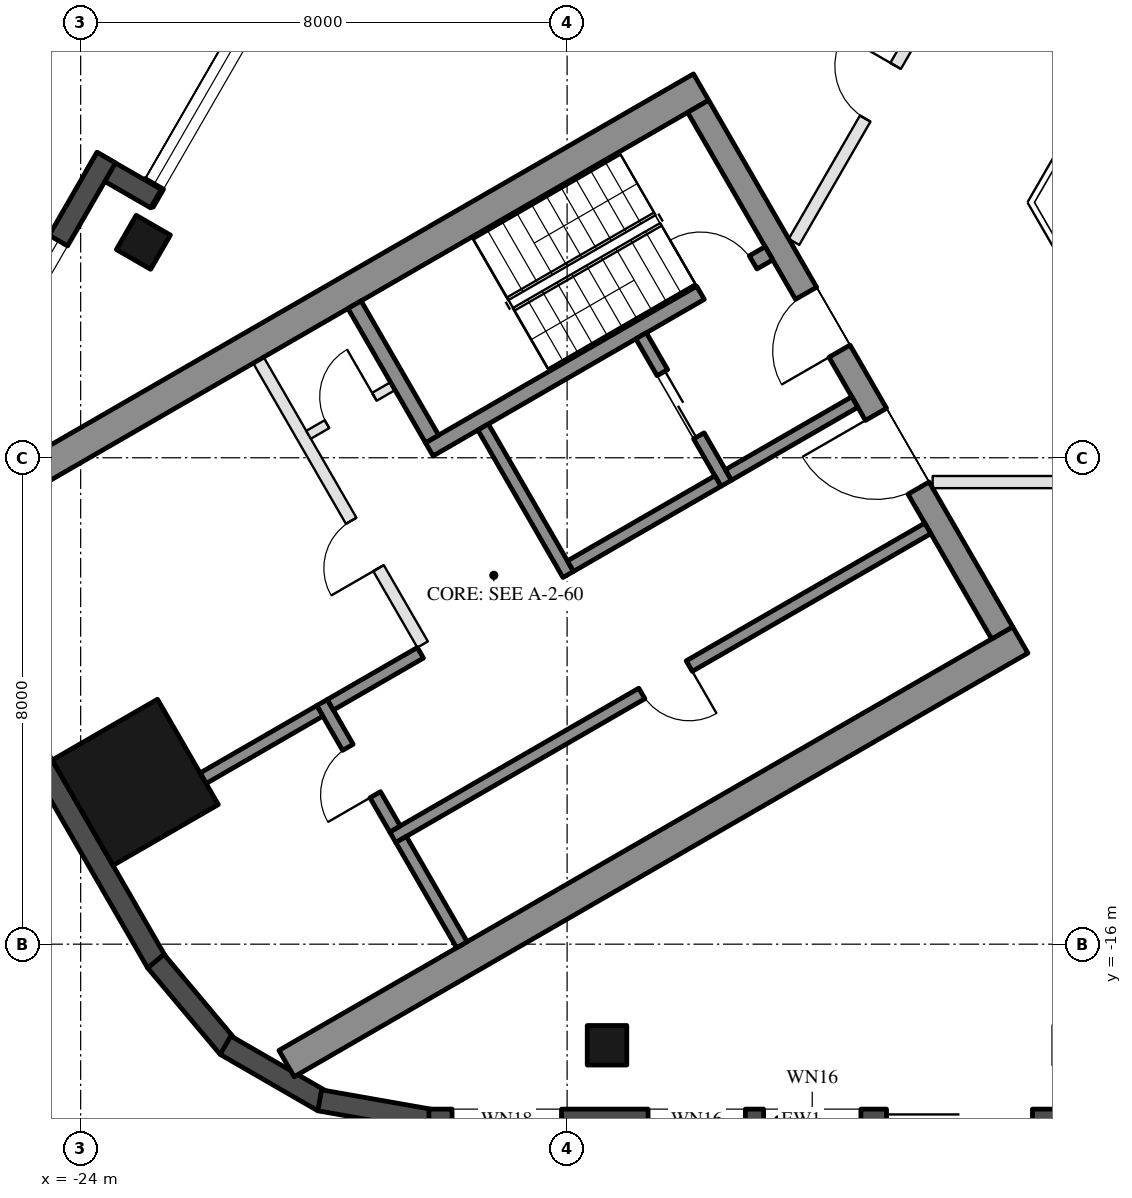
"""IFC4 building model, lengths in metres.
Left out: names, types, materials, properties, quantities, classifications, styles, units other than length and angle.
Written with IfcOpenShell. Run it as: python <this file> out.ifc"""

import sys

from ifc_helpers import new_model, si_unit, direction, frame, frame_2d, origin, origin_2d, place, context, subcontext, project, spatial, rectangle, hollow_rectangle, extrude, boolean, halfspace, element, fill, save


model = new_model("IFC4")
c1 = context("Model", 3, precision=1e-05, world=origin(), true_north=direction((0.0, 1.0)))
c2 = subcontext(c1, "Body", "Model", "MODEL_VIEW")
j1 = project(units=[si_unit("LENGTHUNIT", "METRE"), si_unit("PLANEANGLEUNIT", "RADIAN")], contexts=[c1])
p1 = place(None, origin())
s1 = spatial("IfcSite", under=j1, at=p1, CompositionType="ELEMENT")
p2 = place(p1, origin())
s2 = spatial("IfcBuilding", under=s1, at=p2, CompositionType="ELEMENT")
p3 = place(p2, frame((0.0, 0.0, 257.8)))
s3 = spatial("IfcBuildingStorey", under=s2, at=p3, CompositionType="ELEMENT", Elevation=257.8)
for number, where, z_axis, x_axis in (
    (1, (-15.344, -17.663, 0.0), (0.0, 0.0, 1.0), (-1.0, 0.0, 0.0)),
    (2, (-22.968, -4.457, 0.0), (0.0, 0.0, 1.0), (0.5, 0.866, 0.0)),
):
    element("IfcColumn", number, at=place(p3, frame(where, z_axis=z_axis, x_axis=x_axis)), inside=s3, PredefinedType="COLUMN", context=c2, shape_type="SweptSolid", body=[
        boolean("DIFFERENCE", extrude(hollow_rectangle(XDim=0.65, YDim=0.65, WallThickness=0.03, at=origin_2d()), origin(), (0.0, 0.0, 1.0), 3.7), halfspace(frame((0.0, 0.0, 0.047), z_axis=(0.0, 0.0, 1.0), x_axis=(1.0, 0.0, 0.0)), True)),
    ])
p4 = place(p3, frame((-23.102, -13.338, 0.0), z_axis=(0.0, 0.0, 1.0), x_axis=(-0.5, 0.866025403784, 0.0)))
e3 = element("IfcColumn", 3, at=p4, inside=s3, PredefinedType="COLUMN", context=c2, shape_type="SweptSolid", body=[
    boolean("DIFFERENCE", extrude(hollow_rectangle(XDim=2.0, YDim=2.0, WallThickness=0.05, at=origin_2d()), origin(), (0.0, 0.0, 1.0), 3.7), halfspace(frame((0.0, 0.0, 0.112), z_axis=(0.0, 0.0, 1.0), x_axis=(1.0, 0.0, 0.0)), True)),
])
p5 = place(p3, frame((-19.704, 1.848, 0.0), z_axis=(0.0, 0.0, 1.0), x_axis=(-0.499993986225, -0.866028875811, 0.0)))
e4 = element("IfcWall", 4, at=p5, inside=s3, PredefinedType="SOLIDWALL", context=c2, shape_type="SweptSolid", body=[
    extrude(rectangle(XDim=6.512, YDim=0.35, at=frame_2d((3.256, 0.0))), origin(), (0.0, 0.0, 1.0), 3.55),
])
p6 = place(p5, frame((0.77, 0.0, 0.0)))
e5 = element("IfcOpeningElement", 5, at=p6, cuts=e4, PredefinedType="OPENING", context=c2, shape_type="SweptSolid", body=[
    extrude(rectangle(XDim=2.4, YDim=2.4, at=frame_2d((1.2, 1.2))), frame((0.0, 0.185, 0.0), z_axis=(0.0, -1.0, 0.0), x_axis=(1.0, 0.0, 0.0)), (0.0, 0.0, 1.0), 0.37),
])
p7 = place(p5, frame((3.47, 0.0, 0.3)))
e6 = element("IfcOpeningElement", 6, at=p7, cuts=e4, PredefinedType="OPENING", context=c2, shape_type="SweptSolid", body=[
    extrude(rectangle(XDim=2.7, YDim=2.65, at=frame_2d((1.35, 1.325))), frame((0.0, 0.185, 0.0), z_axis=(0.0, -1.0, 0.0), x_axis=(1.0, 0.0, 0.0)), (0.0, 0.0, 1.0), 0.37),
])
p8 = place(p3, frame((-22.762, -3.739, 0.0), z_axis=(0.0, 0.0, 1.0), x_axis=(-0.866042269935, 0.499970785833, 0.0)))
e7 = element("IfcWall", 7, at=p8, inside=s3, PredefinedType="SOLIDWALL", context=c2, shape_type="SweptSolid", body=[
    extrude(rectangle(XDim=1.22, YDim=0.35, at=frame_2d((0.61, 0.0))), origin(), (0.0, 0.0, 1.0), 3.55),
])
p9 = place(p3, frame((-23.579, -3.065, 0.0), z_axis=(0.0, 0.0, 1.0), x_axis=(-0.500048109927, -0.865997625723, 0.0)))
e8 = element("IfcWall", 8, at=p9, inside=s3, PredefinedType="SOLIDWALL", context=c2, shape_type="SweptSolid", body=[
    extrude(rectangle(XDim=3.829, YDim=0.35, at=frame_2d((1.914, 0.0))), origin(), (0.0, 0.0, 1.0), 3.55),
])
p10 = place(p9, frame((1.575, 0.0, 0.3)))
e9 = element("IfcOpeningElement", 9, at=p10, cuts=e8, PredefinedType="OPENING", context=c2, shape_type="SweptSolid", body=[
    extrude(rectangle(XDim=0.8, YDim=2.65, at=frame_2d((0.4, 1.325))), frame((0.0, 0.185, 0.0), z_axis=(0.0, -1.0, 0.0), x_axis=(1.0, 0.0, 0.0)), (0.0, 0.0, 1.0), 0.37),
])
p11 = place(p3, frame((-25.494, -11.546, 0.0), z_axis=(0.0, 0.0, 1.0), x_axis=(0.500028854569, -0.86600874395, 0.0)))
e10 = element("IfcWall", 10, at=p11, inside=s3, PredefinedType="SOLIDWALL", context=c2, shape_type="SweptSolid", body=[
    extrude(rectangle(XDim=5.495, YDim=0.35, at=frame_2d((2.748, 0.0))), origin(), (0.0, 0.0, 1.0), 3.55),
])
for number, where, z_axis, x_axis in (
    (11, (-22.764, -16.28, 0.0), (0.0, 0.0, 1.0), (0.643, -0.766, 0.0)),
    (12, (-21.618, -17.662, 0.0), (0.0, 0.0, 1.0), (0.866, -0.5, 0.0)),
):
    element("IfcWall", number, at=place(p3, frame(where, z_axis=z_axis, x_axis=x_axis)), inside=s3, PredefinedType="SOLIDWALL", context=c2, shape_type="SweptSolid", body=[
        extrude(rectangle(XDim=1.855, YDim=0.35, at=frame_2d((0.927, 0.0))), origin(), (0.0, 0.0, 1.0), 3.55),
    ])
p12 = place(p3, frame((-20.069, -18.568, 0.0), z_axis=(0.0, 0.0, 1.0), x_axis=(0.984791508075, -0.173740282098, 0.0)))
e13 = element("IfcWall", 13, at=p12, inside=s3, PredefinedType="SOLIDWALL", context=c2, shape_type="SweptSolid", body=[
    extrude(rectangle(XDim=1.855, YDim=0.35, at=frame_2d((0.927, 0.0))), origin(), (0.0, 0.0, 1.0), 3.55),
])
p13 = place(p3, frame((-18.272, -18.888, 0.0), z_axis=(0.0, 0.0, 1.0), x_axis=(1.0, 0.0, 0.0)))
e14 = element("IfcWall", 14, at=p13, inside=s3, PredefinedType="SOLIDWALL", context=c2, shape_type="SweptSolid", body=[
    extrude(rectangle(XDim=11.5, YDim=0.35, at=frame_2d((5.75, 0.0))), origin(), (0.0, 0.0, 1.0), 3.55),
])
p14 = place(p13, frame((0.38, 0.0, 0.3)))
e15 = element("IfcOpeningElement", 15, at=p14, cuts=e14, PredefinedType="OPENING", context=c2, shape_type="SweptSolid", body=[
    extrude(rectangle(XDim=1.8, YDim=2.65, at=frame_2d((0.9, 1.325))), frame((0.0, 0.185, 0.0), z_axis=(0.0, -1.0, 0.0), x_axis=(1.0, 0.0, 0.0)), (0.0, 0.0, 1.0), 0.37),
])
p15 = place(p13, frame((7.525, 0.0, 0.0)))
e16 = element("IfcOpeningElement", 16, at=p15, cuts=e14, PredefinedType="OPENING", context=c2, shape_type="SweptSolid", body=[
    extrude(rectangle(XDim=2.4, YDim=2.4, at=frame_2d((1.2, 1.2))), frame((0.0, 0.185, 0.0), z_axis=(0.0, -1.0, 0.0), x_axis=(1.0, 0.0, 0.0)), (0.0, 0.0, 1.0), 0.37),
])
p16 = place(p13, frame((3.604, 0.0, 0.3)))
e17 = element("IfcOpeningElement", 17, at=p16, cuts=e14, PredefinedType="OPENING", context=c2, shape_type="SweptSolid", body=[
    extrude(rectangle(XDim=1.6, YDim=2.65, at=frame_2d((0.8, 1.325))), frame((0.0, 0.185, 0.0), z_axis=(0.0, -1.0, 0.0), x_axis=(1.0, 0.0, 0.0)), (0.0, 0.0, 1.0), 0.37),
])
p17 = place(p13, frame((5.504, 0.0, 0.3)))
e18 = element("IfcOpeningElement", 18, at=p17, cuts=e14, PredefinedType="OPENING", context=c2, shape_type="SweptSolid", body=[
    extrude(rectangle(XDim=1.6, YDim=2.65, at=frame_2d((0.8, 1.325))), frame((0.0, 0.185, 0.0), z_axis=(0.0, -1.0, 0.0), x_axis=(1.0, 0.0, 0.0)), (0.0, 0.0, 1.0), 0.37),
])
for number, where, z_axis, x_axis in (
    (19, (-13.797, -1.903, 0.0), (0.0, 0.0, 1.0), (-0.866, -0.5, 0.0)),
    (20, (-8.547, -10.997, 0.0), (0.0, 0.0, 1.0), (-0.866, -0.5, 0.0)),
):
    element("IfcWall", number, at=place(p3, frame(where, z_axis=z_axis, x_axis=x_axis)), inside=s3, PredefinedType="SHEAR", context=c2, shape_type="SweptSolid", body=[
        extrude(rectangle(XDim=13.934, YDim=0.5, at=frame_2d((6.967, 0.0))), origin(), (0.0, 0.0, 1.0), 3.5),
    ])
p18 = place(p3, frame((-13.845, -2.22, 0.0), z_axis=(0.0, 0.0, 1.0), x_axis=(0.500004234368, -0.866022959057, 0.0)))
e21 = element("IfcWall", 21, at=p18, inside=s3, PredefinedType="SHEAR", context=c2, shape_type="SweptSolid", body=[
    extrude(rectangle(XDim=10.0, YDim=0.4, at=frame_2d((5.0, 0.0))), origin(), (0.0, 0.0, 1.0), 3.5),
])
p19 = place(p18, frame((3.55, 0.0, 0.0)))
e22 = element("IfcOpeningElement", 22, at=p19, cuts=e21, PredefinedType="OPENING", context=c2, shape_type="SweptSolid", body=[
    extrude(rectangle(XDim=1.1, YDim=2.1, at=frame_2d((0.55, 1.05))), frame((0.0, 0.21, 0.0), z_axis=(0.0, -1.0, 0.0), x_axis=(1.0, 0.0, 0.0)), (0.0, 0.0, 1.0), 0.42),
])
p20 = place(p18, frame((5.85, 0.0, 0.0)))
e23 = element("IfcOpeningElement", 23, at=p20, cuts=e21, PredefinedType="OPENING", context=c2, shape_type="SweptSolid", body=[
    extrude(rectangle(XDim=1.4, YDim=2.1, at=frame_2d((0.7, 1.05))), frame((0.0, 0.21, 0.0), z_axis=(0.0, -1.0, 0.0), x_axis=(1.0, 0.0, 0.0)), (0.0, 0.0, 1.0), 0.42),
])
p21 = place(p3, frame((-12.681, -4.636, 0.0), z_axis=(0.0, 0.0, 1.0), x_axis=(-0.866021702275, -0.500006411147, 0.0)))
e24 = element("IfcWall", 24, at=p21, inside=s3, PredefinedType="SHEAR", context=c2, shape_type="SweptSolid", body=[
    extrude(rectangle(XDim=6.45, YDim=0.25, at=frame_2d((3.225, 0.0))), origin(), (0.0, 0.0, 1.0), 3.5),
])
p22 = place(p21, frame((0.3, 0.0, 0.0)))
e25 = element("IfcOpeningElement", 25, at=p22, cuts=e24, PredefinedType="OPENING", context=c2, shape_type="SweptSolid", body=[
    extrude(rectangle(XDim=1.0, YDim=2.1, at=frame_2d((0.5, 1.05))), frame((0.0, 0.135, 0.0), z_axis=(0.0, -1.0, 0.0), x_axis=(1.0, 0.0, 0.0)), (0.0, 0.0, 1.0), 0.27),
])
p23 = place(p3, frame((-19.496, -5.482, 0.0), z_axis=(0.0, 0.0, 1.0), x_axis=(0.499990435942, -0.866030925526, 0.0)))
e26 = element("IfcWall", 26, at=p23, inside=s3, PredefinedType="SHEAR", context=c2, shape_type="SweptSolid", body=[
    extrude(rectangle(XDim=2.55, YDim=0.25, at=frame_2d((1.275, 0.0))), origin(), (0.0, 0.0, 1.0), 3.5),
])
p24 = place(p3, frame((-17.381, -7.495, 0.0), z_axis=(0.0, 0.0, 1.0), x_axis=(0.500011755427, -0.866018616679, 0.0)))
e27 = element("IfcWall", 27, at=p24, inside=s3, PredefinedType="SHEAR", context=c2, shape_type="SweptSolid", body=[
    extrude(rectangle(XDim=2.8, YDim=0.2, at=frame_2d((1.4, 0.0))), origin(), (0.0, 0.0, 1.0), 3.5),
])
p25 = place(p3, frame((-14.783, -5.995, 0.0), z_axis=(0.0, 0.0, 1.0), x_axis=(0.49994636267, -0.866056369097, 0.0)))
e28 = element("IfcWall", 28, at=p25, inside=s3, PredefinedType="SHEAR", context=c2, shape_type="SweptSolid", body=[
    extrude(rectangle(XDim=2.8, YDim=0.2, at=frame_2d((1.4, 0.0))), origin(), (0.0, 0.0, 1.0), 3.5),
])
p26 = place(p25, frame((0.7, 0.0, 0.0)))
e29 = element("IfcOpeningElement", 29, at=p26, cuts=e28, PredefinedType="OPENING", context=c2, shape_type="SweptSolid", body=[
    extrude(rectangle(XDim=1.2, YDim=2.1, at=frame_2d((0.6, 1.05))), frame((0.0, 0.11, 0.0), z_axis=(0.0, -1.0, 0.0), x_axis=(1.0, 0.0, 0.0)), (0.0, 0.0, 1.0), 0.22),
])
p27 = place(p3, frame((-13.52, -8.383, 0.0), z_axis=(0.0, 0.0, 1.0), x_axis=(-0.866034573852, -0.49998411664, 0.0)))
e30 = element("IfcWall", 30, at=p27, inside=s3, PredefinedType="SHEAR", context=c2, shape_type="SweptSolid", body=[
    extrude(rectangle(XDim=2.8, YDim=0.2, at=frame_2d((1.4, 0.0))), origin(), (0.0, 0.0, 1.0), 3.5),
])
p28 = place(p3, frame((-11.268, -7.083, 0.0), z_axis=(0.0, 0.0, 1.0), x_axis=(-0.866050077142, -0.499957262057, 0.0)))
e31 = element("IfcWall", 31, at=p28, inside=s3, PredefinedType="SHEAR", context=c2, shape_type="SweptSolid", body=[
    extrude(rectangle(XDim=2.4, YDim=0.2, at=frame_2d((1.2, 0.0))), origin(), (0.0, 0.0, 1.0), 3.5),
])
p29 = place(p3, frame((-10.068, -9.162, 0.0), z_axis=(0.0, 0.0, 1.0), x_axis=(-0.866032725843, -0.499987317609, 0.0)))
e32 = element("IfcWall", 32, at=p29, inside=s3, PredefinedType="SHEAR", context=c2, shape_type="SweptSolid", body=[
    extrude(rectangle(XDim=10.16, YDim=0.2, at=frame_2d((5.08, 0.0))), origin(), (0.0, 0.0, 1.0), 3.5),
])
p30 = place(p29, frame((4.53, 0.0, 0.0)))
e33 = element("IfcOpeningElement", 33, at=p30, cuts=e32, PredefinedType="OPENING", context=c2, shape_type="SweptSolid", body=[
    extrude(rectangle(XDim=0.9, YDim=2.1, at=frame_2d((0.45, 1.05))), frame((0.0, 0.11, 0.0), z_axis=(0.0, -1.0, 0.0), x_axis=(1.0, 0.0, 0.0)), (0.0, 0.0, 1.0), 0.22),
])
p31 = place(p3, frame((-20.031, -12.026, 0.0), z_axis=(0.0, 0.0, 1.0), x_axis=(0.500033551112, -0.866006032174, 0.0)))
e34 = element("IfcWall", 34, at=p31, inside=s3, PredefinedType="SHEAR", context=c2, shape_type="SweptSolid", body=[
    extrude(rectangle(XDim=2.4, YDim=0.2, at=frame_2d((1.2, 0.0))), origin(), (0.0, 0.0, 1.0), 3.5),
])
p32 = place(p31, frame((0.85, 0.0, 0.0)))
e35 = element("IfcOpeningElement", 35, at=p32, cuts=e34, PredefinedType="OPENING", context=c2, shape_type="SweptSolid", body=[
    extrude(rectangle(XDim=0.9, YDim=2.1, at=frame_2d((0.45, 1.05))), frame((0.0, 0.11, 0.0), z_axis=(0.0, -1.0, 0.0), x_axis=(1.0, 0.0, 0.0)), (0.0, 0.0, 1.0), 0.22),
])
p33 = place(p3, frame((-18.413, -11.208, 0.0), z_axis=(0.0, 0.0, 1.0), x_axis=(-0.866038183914, -0.499977863513, 0.0)))
e36 = element("IfcWall", 36, at=p33, inside=s3, PredefinedType="SHEAR", context=c2, shape_type="SweptSolid", body=[
    extrude(rectangle(XDim=1.71, YDim=0.2, at=frame_2d((0.855, 0.0))), origin(), (0.0, 0.0, 1.0), 3.5),
])
p34 = place(p3, frame((-18.73, -14.278, 0.0), z_axis=(0.0, 0.0, 1.0), x_axis=(0.50002537861, -0.866010750942, 0.0)))
e37 = element("IfcWall", 37, at=p34, inside=s3, PredefinedType="SHEAR", context=c2, shape_type="SweptSolid", body=[
    extrude(rectangle(XDim=2.0, YDim=0.2, at=frame_2d((1.0, 0.0))), origin(), (0.0, 0.0, 1.0), 3.5),
])
p35 = place(p3, frame((-20.067, -12.163, 0.0), z_axis=(0.0, 0.0, 1.0), x_axis=(-0.866079196458, -0.49990681678, 0.0)))
e38 = element("IfcWall", 38, at=p35, inside=s3, PredefinedType="SHEAR", context=c2, shape_type="SweptSolid", body=[
    extrude(rectangle(XDim=2.216, YDim=0.2, at=frame_2d((1.108, 0.0))), origin(), (0.0, 0.0, 1.0), 3.5),
])
p36 = place(p3, frame((-21.076, -6.395, 0.0), z_axis=(0.0, 0.0, 1.0), x_axis=(0.50001468107, -0.866016927499, 0.0)))
e39 = element("IfcWall", 39, at=p36, inside=s3, PredefinedType="PARTITIONING", context=c2, shape_type="SweptSolid", body=[
    extrude(rectangle(XDim=5.4, YDim=0.2, at=frame_2d((2.7, 0.0))), origin(), (0.0, 0.0, 1.0), 3.5),
])
p37 = place(p36, frame((3.05, 0.0, 0.0)))
e40 = element("IfcOpeningElement", 40, at=p37, cuts=e39, PredefinedType="OPENING", context=c2, shape_type="SweptSolid", body=[
    extrude(rectangle(XDim=0.9, YDim=2.1, at=frame_2d((0.45, 1.05))), frame((0.0, 0.11, 0.0), z_axis=(0.0, -1.0, 0.0), x_axis=(1.0, 0.0, 0.0)), (0.0, 0.0, 1.0), 0.22),
])
p38 = place(p3, frame((-18.866, -6.822, 0.0), z_axis=(0.0, 0.0, 1.0), x_axis=(-0.866028054938, -0.499995408039, 0.0)))
e41 = element("IfcWall", 41, at=p38, inside=s3, PredefinedType="PARTITIONING", context=c2, shape_type="SweptSolid", body=[
    extrude(rectangle(XDim=1.6, YDim=0.15, at=frame_2d((0.8, 0.0))), origin(), (0.0, 0.0, 1.0), 3.5),
])
p39 = place(p38, frame((0.35, 0.0, 0.0)))
e42 = element("IfcOpeningElement", 42, at=p39, cuts=e41, PredefinedType="OPENING", context=c2, shape_type="SweptSolid", body=[
    extrude(rectangle(XDim=0.9, YDim=2.1, at=frame_2d((0.45, 1.05))), frame((0.0, 0.085, 0.0), z_axis=(0.0, -1.0, 0.0), x_axis=(1.0, 0.0, 0.0)), (0.0, 0.0, 1.0), 0.17),
])
p40 = place(p3, frame((-4.708, -8.4, 0.0), z_axis=(0.0, 0.0, 1.0), x_axis=(-1.0, 0.0, 0.0)))
e43 = element("IfcWall", 43, at=p40, inside=s3, PredefinedType="PARTITIONING", context=c2, shape_type="SweptSolid", body=[
    extrude(rectangle(XDim=5.281, YDim=0.2, at=frame_2d((2.64, 0.0))), origin(), (0.0, 0.0, 1.0), 3.0),
])
p41 = place(p40, frame((2.14, 0.0, 0.0)))
e44 = element("IfcOpeningElement", 44, at=p41, cuts=e43, PredefinedType="OPENING", context=c2, shape_type="SweptSolid", body=[
    extrude(rectangle(XDim=1.0, YDim=2.1, at=frame_2d((0.5, 1.05))), frame((0.0, 0.11, 0.0), z_axis=(0.0, -1.0, 0.0), x_axis=(1.0, 0.0, 0.0)), (0.0, 0.0, 1.0), 0.22),
])
p42 = place(p3, frame((-12.269, -4.45, 0.0), z_axis=(0.0, 0.0, 1.0), x_axis=(0.500009958894, 0.866019653938, 0.0)))
e45 = element("IfcWall", 45, at=p42, inside=s3, PredefinedType="PARTITIONING", context=c2, shape_type="SweptSolid", body=[
    extrude(rectangle(XDim=5.685, YDim=0.2, at=frame_2d((2.842, 0.0))), origin(), (0.0, 0.0, 1.0), 3.0),
])
p43 = place(p42, frame((2.342, 0.0, 0.0)))
e46 = element("IfcOpeningElement", 46, at=p43, cuts=e45, PredefinedType="OPENING", context=c2, shape_type="SweptSolid", body=[
    extrude(rectangle(XDim=1.0, YDim=2.1, at=frame_2d((0.5, 1.05))), frame((0.0, 0.11, 0.0), z_axis=(0.0, -1.0, 0.0), x_axis=(1.0, 0.0, 0.0)), (0.0, 0.0, 1.0), 0.22),
])
p44 = place(p7, origin())
e47 = element("IfcWindow", 47, at=p44, inside=s3, PartitioningType="SINGLE_PANEL", PredefinedType="WINDOW", context=c2, shape_type="SweptSolid", body=[
    extrude(rectangle(XDim=2.7, YDim=2.65, at=frame_2d((1.35, 1.325))), frame((0.0, 0.03, 0.0), z_axis=(0.0, -1.0, 0.0), x_axis=(1.0, 0.0, 0.0)), (0.0, 0.0, 1.0), 0.06),
])
fill(e6, e47)
p45 = place(p10, origin())
e48 = element("IfcWindow", 48, at=p45, inside=s3, PartitioningType="SINGLE_PANEL", PredefinedType="WINDOW", context=c2, shape_type="SweptSolid", body=[
    extrude(rectangle(XDim=0.8, YDim=2.65, at=frame_2d((0.4, 1.325))), frame((0.0, 0.03, 0.0), z_axis=(0.0, -1.0, 0.0), x_axis=(1.0, 0.0, 0.0)), (0.0, 0.0, 1.0), 0.06),
])
fill(e9, e48)
p46 = place(p26, origin())
e49 = element("IfcDoor", 49, at=p46, inside=s3, OperationType="DOUBLE_DOOR_SLIDING", PredefinedType="DOOR", context=c2, shape_type="SweptSolid", body=[
    extrude(rectangle(XDim=1.2, YDim=2.1, at=frame_2d((0.6, 1.05))), frame((0.0, 0.025, 0.0), z_axis=(0.0, -1.0, 0.0), x_axis=(1.0, 0.0, 0.0)), (0.0, 0.0, 1.0), 0.05),
])
fill(e29, e49)
p47 = place(p39, frame((0.9, 0.0, 0.0), z_axis=(0.0, 0.0, 1.0), x_axis=(-1.0, 0.0, 0.0)))
e50 = element("IfcDoor", 50, at=p47, inside=s3, OperationType="SINGLE_SWING_RIGHT", PredefinedType="DOOR", context=c2, shape_type="SweptSolid", body=[
    extrude(rectangle(XDim=0.9, YDim=2.1, at=frame_2d((0.45, 1.05))), frame((0.0, 0.025, 0.0), z_axis=(0.0, -1.0, 0.0), x_axis=(1.0, 0.0, 0.0)), (0.0, 0.0, 1.0), 0.05),
])
fill(e42, e50)
p48 = place(p30, origin())
e51 = element("IfcDoor", 51, at=p48, inside=s3, OperationType="SINGLE_SWING_LEFT", PredefinedType="DOOR", context=c2, shape_type="SweptSolid", body=[
    extrude(rectangle(XDim=0.9, YDim=2.1, at=frame_2d((0.45, 1.05))), frame((0.0, 0.025, 0.0), z_axis=(0.0, -1.0, 0.0), x_axis=(1.0, 0.0, 0.0)), (0.0, 0.0, 1.0), 0.05),
])
fill(e33, e51)
p49 = place(p32, frame((0.9, 0.0, 0.0), z_axis=(0.0, 0.0, 1.0), x_axis=(-1.0, 0.0, 0.0)))
e52 = element("IfcDoor", 52, at=p49, inside=s3, OperationType="SINGLE_SWING_LEFT", PredefinedType="DOOR", context=c2, shape_type="SweptSolid", body=[
    extrude(rectangle(XDim=0.9, YDim=2.1, at=frame_2d((0.45, 1.05))), frame((0.0, 0.025, 0.0), z_axis=(0.0, -1.0, 0.0), x_axis=(1.0, 0.0, 0.0)), (0.0, 0.0, 1.0), 0.05),
])
fill(e35, e52)
p50 = place(p37, frame((0.9, 0.0, 0.0), z_axis=(0.0, 0.0, 1.0), x_axis=(-1.0, 0.0, 0.0)))
e53 = element("IfcDoor", 53, at=p50, inside=s3, OperationType="SINGLE_SWING_LEFT", PredefinedType="DOOR", context=c2, shape_type="SweptSolid", body=[
    extrude(rectangle(XDim=0.9, YDim=2.1, at=frame_2d((0.45, 1.05))), frame((0.0, 0.025, 0.0), z_axis=(0.0, -1.0, 0.0), x_axis=(1.0, 0.0, 0.0)), (0.0, 0.0, 1.0), 0.05),
])
fill(e40, e53)
p51 = place(p19, frame((1.1, 0.0, 0.0), z_axis=(0.0, 0.0, 1.0), x_axis=(-1.0, 0.0, 0.0)))
e54 = element("IfcDoor", 54, at=p51, inside=s3, OperationType="SINGLE_SWING_LEFT", PredefinedType="DOOR", context=c2, shape_type="SweptSolid", body=[
    extrude(rectangle(XDim=1.1, YDim=2.1, at=frame_2d((0.55, 1.05))), frame((0.0, 0.025, 0.0), z_axis=(0.0, -1.0, 0.0), x_axis=(1.0, 0.0, 0.0)), (0.0, 0.0, 1.0), 0.05),
])
fill(e22, e54)
p52 = place(p20, frame((1.4, 0.0, 0.0), z_axis=(0.0, 0.0, 1.0), x_axis=(-1.0, 0.0, 0.0)))
e55 = element("IfcDoor", 55, at=p52, inside=s3, OperationType="DOUBLE_DOOR_SINGLE_SWING", PredefinedType="DOOR", context=c2, shape_type="SweptSolid", body=[
    extrude(rectangle(XDim=1.4, YDim=2.1, at=frame_2d((0.7, 1.05))), frame((0.0, 0.025, 0.0), z_axis=(0.0, -1.0, 0.0), x_axis=(1.0, 0.0, 0.0)), (0.0, 0.0, 1.0), 0.05),
])
fill(e23, e55)
p53 = place(p22, frame((1.0, 0.0, 0.0), z_axis=(0.0, 0.0, 1.0), x_axis=(-1.0, 0.0, 0.0)))
e56 = element("IfcDoor", 56, at=p53, inside=s3, OperationType="SINGLE_SWING_LEFT", PredefinedType="DOOR", context=c2, shape_type="SweptSolid", body=[
    extrude(rectangle(XDim=1.0, YDim=2.1, at=frame_2d((0.5, 1.05))), frame((0.0, 0.025, 0.0), z_axis=(0.0, -1.0, 0.0), x_axis=(1.0, 0.0, 0.0)), (0.0, 0.0, 1.0), 0.05),
])
fill(e25, e56)
p54 = place(p43, origin())
e57 = element("IfcDoor", 57, at=p54, inside=s3, OperationType="SINGLE_SWING_RIGHT", PredefinedType="DOOR", context=c2, shape_type="SweptSolid", body=[
    extrude(rectangle(XDim=1.0, YDim=2.1, at=frame_2d((0.5, 1.05))), frame((0.0, 0.025, 0.0), z_axis=(0.0, -1.0, 0.0), x_axis=(1.0, 0.0, 0.0)), (0.0, 0.0, 1.0), 0.05),
])
fill(e46, e57)
save(model, sys.argv[1])
